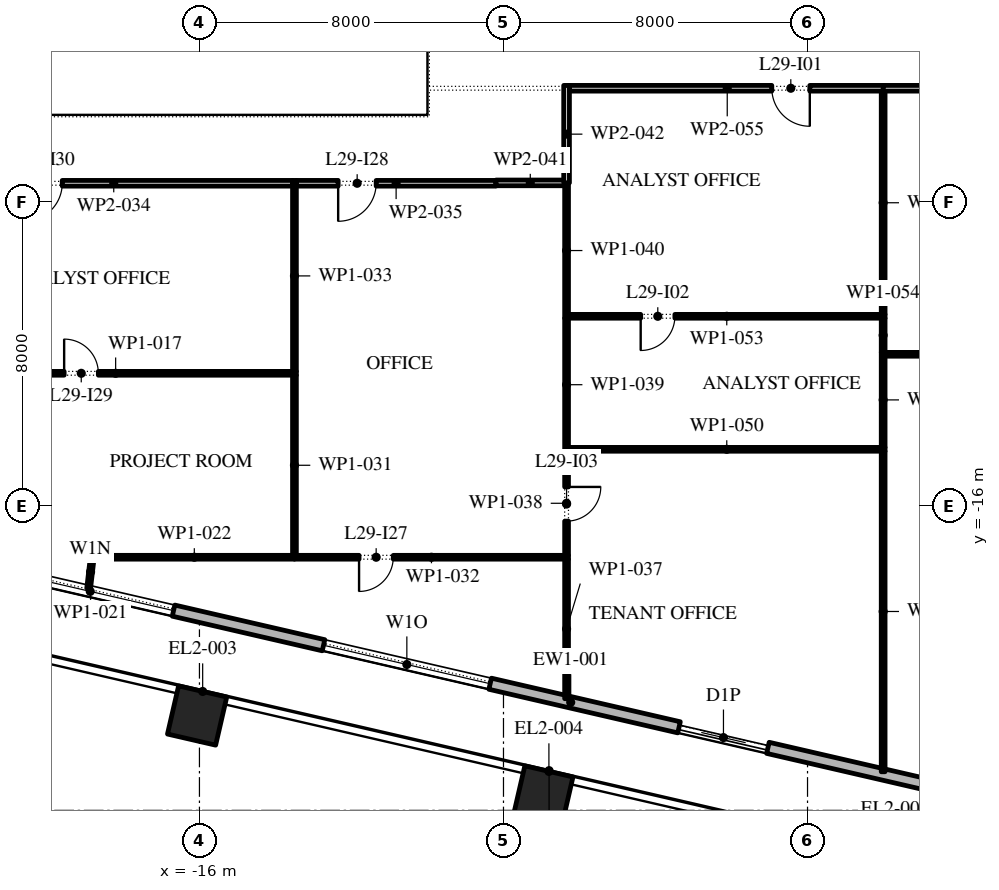
"""IFC4 building model, lengths in metres.
Left out: names, types, materials, properties, quantities, classifications, styles, units other than length and angle.
Written with IfcOpenShell. Run it as: python <this file> out.ifc"""

import sys

from ifc_helpers import new_model, si_unit, direction, frame, frame_2d, origin, origin_2d, place, context, subcontext, project, spatial, rectangle, extrude, element, fill, save


model = new_model("IFC4")
c1 = context("Model", 3, precision=1e-05, world=origin(), true_north=direction((0.0, 1.0)))
c2 = subcontext(c1, "Body", "Model", "MODEL_VIEW")
j1 = project(units=[si_unit("LENGTHUNIT", "METRE"), si_unit("PLANEANGLEUNIT", "RADIAN")], contexts=[c1])
p1 = place(None, origin())
s1 = spatial("IfcSite", under=j1, at=p1, CompositionType="ELEMENT")
p2 = place(p1, origin())
s2 = spatial("IfcBuilding", under=s1, at=p2, CompositionType="ELEMENT")
p3 = place(p2, frame((0.0, 0.0, 135.0)))
s3 = spatial("IfcBuildingStorey", under=s2, at=p3, CompositionType="ELEMENT", Elevation=135.0)
for number, where, z_axis, x_axis in (
    (1, (-16.061, -21.505, 0.0), (0.0, 0.0, 1.0), (0.974, -0.225, 0.0)),
    (2, (-6.951, -23.608, 0.0), (0.0, 0.0, 1.0), (0.974, -0.225, 0.0)),
):
    element("IfcColumn", number, at=place(p3, frame(where, z_axis=z_axis, x_axis=x_axis)), inside=s3, PredefinedType="COLUMN", context=c2, shape_type="SweptSolid", body=[
        extrude(rectangle(XDim=1.3, YDim=1.3, at=origin_2d()), origin(), (0.0, 0.0, 1.0), 4.2),
    ])
p4 = place(p3, frame((-31.078, -15.421, 0.0), z_axis=(0.0, 0.0, 1.0), x_axis=(0.974370456532, -0.224949357493, 0.0)))
e3 = element("IfcWall", 3, at=p4, inside=s3, PredefinedType="STANDARD", context=c2, shape_type="SweptSolid", body=[
    extrude(rectangle(XDim=51.0, YDim=0.3, at=frame_2d((25.5, 0.0))), origin(), (0.0, 0.0, 1.0), 4.0),
])
p5 = place(p4, frame((1.875, 0.0, 0.45)))
e4 = element("IfcOpeningElement", 4, at=p5, cuts=e3, PredefinedType="OPENING", context=c2, shape_type="SweptSolid", body=[
    extrude(rectangle(XDim=4.5, YDim=2.575, at=frame_2d((2.25, 1.288))), frame((0.0, 0.16, 0.0), z_axis=(0.0, -1.0, 0.0), x_axis=(1.0, 0.0, 0.0)), (0.0, 0.0, 1.0), 0.32),
])
p6 = place(p4, frame((10.275, 0.0, 0.45)))
e5 = element("IfcOpeningElement", 5, at=p6, cuts=e3, PredefinedType="OPENING", context=c2, shape_type="SweptSolid", body=[
    extrude(rectangle(XDim=4.5, YDim=2.525, at=frame_2d((2.25, 1.262))), frame((0.0, 0.16, 0.0), z_axis=(0.0, -1.0, 0.0), x_axis=(1.0, 0.0, 0.0)), (0.0, 0.0, 1.0), 0.32),
])
p7 = place(p4, frame((18.825, 0.0, 0.45)))
e6 = element("IfcOpeningElement", 6, at=p7, cuts=e3, PredefinedType="OPENING", context=c2, shape_type="SweptSolid", body=[
    extrude(rectangle(XDim=4.5, YDim=2.5, at=frame_2d((2.25, 1.25))), frame((0.0, 0.16, 0.0), z_axis=(0.0, -1.0, 0.0), x_axis=(1.0, 0.0, 0.0)), (0.0, 0.0, 1.0), 0.32),
])
p8 = place(p4, frame((28.425, 0.0, 0.0)))
e7 = element("IfcOpeningElement", 7, at=p8, cuts=e3, PredefinedType="OPENING", context=c2, shape_type="SweptSolid", body=[
    extrude(rectangle(XDim=2.4, YDim=2.9, at=frame_2d((1.2, 1.45))), frame((0.0, 0.16, 0.0), z_axis=(0.0, -1.0, 0.0), x_axis=(1.0, 0.0, 0.0)), (0.0, 0.0, 1.0), 0.32),
])
p9 = place(p4, frame((35.925, 0.0, 0.45)))
e8 = element("IfcOpeningElement", 8, at=p9, cuts=e3, PredefinedType="OPENING", context=c2, shape_type="SweptSolid", body=[
    extrude(rectangle(XDim=4.5, YDim=2.45, at=frame_2d((2.25, 1.225))), frame((0.0, 0.16, 0.0), z_axis=(0.0, -1.0, 0.0), x_axis=(1.0, 0.0, 0.0)), (0.0, 0.0, 1.0), 0.32),
])
p10 = place(p4, frame((44.475, 0.0, 0.45)))
e9 = element("IfcOpeningElement", 9, at=p10, cuts=e3, PredefinedType="OPENING", context=c2, shape_type="SweptSolid", body=[
    extrude(rectangle(XDim=4.5, YDim=2.45, at=frame_2d((2.25, 1.225))), frame((0.0, 0.16, 0.0), z_axis=(0.0, -1.0, 0.0), x_axis=(1.0, 0.0, 0.0)), (0.0, 0.0, 1.0), 0.32),
])
p11 = place(p3, frame((-22.96, -12.5, 0.0), z_axis=(0.0, 0.0, 1.0), x_axis=(1.0, 0.0, 0.0)))
e10 = element("IfcWall", 10, at=p11, inside=s3, PredefinedType="PARTITIONING", context=c2, shape_type="SweptSolid", body=[
    extrude(rectangle(XDim=9.51, YDim=0.1, at=frame_2d((4.755, 0.0))), origin(), (0.0, 0.0, 1.0), 4.0),
])
p12 = place(p11, frame((3.4, 0.0, 0.0)))
e11 = element("IfcOpeningElement", 11, at=p12, cuts=e10, PredefinedType="OPENING", context=c2, shape_type="SweptSolid", body=[
    extrude(rectangle(XDim=0.9, YDim=2.1, at=frame_2d((0.45, 1.05))), frame((0.0, 0.06, 0.0), z_axis=(0.0, -1.0, 0.0), x_axis=(1.0, 0.0, 0.0)), (0.0, 0.0, 1.0), 0.12),
])
p13 = place(p3, frame((-18.915, -18.157, 0.0), z_axis=(0.0, 0.0, 1.0), x_axis=(0.11580251051, 0.993272258024, 0.0)))
e12 = element("IfcWall", 12, at=p13, inside=s3, PredefinedType="PARTITIONING", context=c2, shape_type="SweptSolid", body=[
    extrude(rectangle(XDim=0.873, YDim=0.1, at=frame_2d((0.437, 0.0))), origin(), (0.0, 0.0, 1.0), 4.0),
])
p14 = place(p3, frame((-18.77, -17.34, 0.0), z_axis=(0.0, 0.0, 1.0), x_axis=(1.0, 0.0, 0.0)))
e13 = element("IfcWall", 13, at=p14, inside=s3, PredefinedType="PARTITIONING", context=c2, shape_type="SweptSolid", body=[
    extrude(rectangle(XDim=5.27, YDim=0.1, at=frame_2d((2.635, 0.0))), origin(), (0.0, 0.0, 1.0), 4.0),
])
p15 = place(p3, frame((-13.5, -17.29, 0.0), z_axis=(0.0, 0.0, 1.0), x_axis=(0.0, 1.0, 0.0)))
e14 = element("IfcWall", 14, at=p15, inside=s3, PredefinedType="PARTITIONING", context=c2, shape_type="SweptSolid", body=[
    extrude(rectangle(XDim=4.74, YDim=0.1, at=frame_2d((2.37, 0.0))), origin(), (0.0, 0.0, 1.0), 4.0),
])
p16 = place(p3, frame((-13.5, -17.34, 0.0), z_axis=(0.0, 0.0, 1.0), x_axis=(1.0, 0.0, 0.0)))
e15 = element("IfcWall", 15, at=p16, inside=s3, PredefinedType="PARTITIONING", context=c2, shape_type="SweptSolid", body=[
    extrude(rectangle(XDim=7.21, YDim=0.1, at=frame_2d((3.605, 0.0))), origin(), (0.0, 0.0, 1.0), 4.0),
])
p17 = place(p16, frame((1.7, 0.0, 0.0)))
e16 = element("IfcOpeningElement", 16, at=p17, cuts=e15, PredefinedType="OPENING", context=c2, shape_type="SweptSolid", body=[
    extrude(rectangle(XDim=0.9, YDim=2.1, at=frame_2d((0.45, 1.05))), frame((0.0, 0.06, 0.0), z_axis=(0.0, -1.0, 0.0), x_axis=(1.0, 0.0, 0.0)), (0.0, 0.0, 1.0), 0.12),
])
p18 = place(p3, frame((-13.5, -12.45, 0.0), z_axis=(0.0, 0.0, 1.0), x_axis=(0.0, 1.0, 0.0)))
e17 = element("IfcWall", 17, at=p18, inside=s3, PredefinedType="PARTITIONING", context=c2, shape_type="SweptSolid", body=[
    extrude(rectangle(XDim=5.025, YDim=0.1, at=frame_2d((2.512, 0.0))), origin(), (0.0, 0.0, 1.0), 4.0),
])
p19 = place(p3, frame((-13.55, -7.5, 0.0), z_axis=(0.0, 0.0, 1.0), x_axis=(-1.0, 0.0, 0.0)))
e18 = element("IfcWall", 18, at=p19, inside=s3, PredefinedType="PARTITIONING", context=c2, shape_type="SweptSolid", body=[
    extrude(rectangle(XDim=9.41, YDim=0.15, at=frame_2d((4.705, 0.0))), origin(), (0.0, 0.0, 1.0), 4.0),
])
p20 = place(p19, frame((6.06, 0.0, 0.0)))
e19 = element("IfcOpeningElement", 19, at=p20, cuts=e18, PredefinedType="OPENING", context=c2, shape_type="SweptSolid", body=[
    extrude(rectangle(XDim=1.0, YDim=2.1, at=frame_2d((0.5, 1.05))), frame((0.0, 0.085, 0.0), z_axis=(0.0, -1.0, 0.0), x_axis=(1.0, 0.0, 0.0)), (0.0, 0.0, 1.0), 0.17),
])
p21 = place(p3, frame((-8.2, -7.5, 0.0), z_axis=(0.0, 0.0, 1.0), x_axis=(-1.0, 0.0, 0.0)))
e20 = element("IfcWall", 20, at=p21, inside=s3, PredefinedType="PARTITIONING", context=c2, shape_type="SweptSolid", body=[
    extrude(rectangle(XDim=5.25, YDim=0.15, at=frame_2d((2.625, 0.0))), origin(), (0.0, 0.0, 1.0), 4.0),
])
p22 = place(p21, frame((3.15, 0.0, 0.0)))
e21 = element("IfcOpeningElement", 21, at=p22, cuts=e20, PredefinedType="OPENING", context=c2, shape_type="SweptSolid", body=[
    extrude(rectangle(XDim=1.0, YDim=2.1, at=frame_2d((0.5, 1.05))), frame((0.0, 0.085, 0.0), z_axis=(0.0, -1.0, 0.0), x_axis=(1.0, 0.0, 0.0)), (0.0, 0.0, 1.0), 0.17),
])
p23 = place(p3, frame((-6.34, -21.061, 0.0), z_axis=(0.0, 0.0, 1.0), x_axis=(0.0, 1.0, 0.0)))
e22 = element("IfcWall", 22, at=p23, inside=s3, PredefinedType="PARTITIONING", context=c2, shape_type="SweptSolid", body=[
    extrude(rectangle(XDim=3.671, YDim=0.1, at=frame_2d((1.835, 0.0))), origin(), (0.0, 0.0, 1.0), 4.0),
])
p24 = place(p3, frame((-6.34, -17.29, 0.0), z_axis=(0.0, 0.0, 1.0), x_axis=(0.0, 1.0, 0.0)))
e23 = element("IfcWall", 23, at=p24, inside=s3, PredefinedType="PARTITIONING", context=c2, shape_type="SweptSolid", body=[
    extrude(rectangle(XDim=2.74, YDim=0.1, at=frame_2d((1.37, 0.0))), origin(), (0.0, 0.0, 1.0), 4.0),
])
p25 = place(p24, frame((0.9, 0.0, 0.0)))
e24 = element("IfcOpeningElement", 24, at=p25, cuts=e23, PredefinedType="OPENING", context=c2, shape_type="SweptSolid", body=[
    extrude(rectangle(XDim=0.9, YDim=2.1, at=frame_2d((0.45, 1.05))), frame((0.0, 0.06, 0.0), z_axis=(0.0, -1.0, 0.0), x_axis=(1.0, 0.0, 0.0)), (0.0, 0.0, 1.0), 0.12),
])
p26 = place(p3, frame((-6.34, -14.55, 0.0), z_axis=(0.0, 0.0, 1.0), x_axis=(0.0, 1.0, 0.0)))
e25 = element("IfcWall", 25, at=p26, inside=s3, PredefinedType="PARTITIONING", context=c2, shape_type="SweptSolid", body=[
    extrude(rectangle(XDim=3.5, YDim=0.1, at=frame_2d((1.75, 0.0))), origin(), (0.0, 0.0, 1.0), 4.0),
])
p27 = place(p3, frame((-6.34, -11.05, 0.0), z_axis=(0.0, 0.0, 1.0), x_axis=(0.0, 1.0, 0.0)))
e26 = element("IfcWall", 26, at=p27, inside=s3, PredefinedType="PARTITIONING", context=c2, shape_type="SweptSolid", body=[
    extrude(rectangle(XDim=3.56, YDim=0.1, at=frame_2d((1.78, 0.0))), origin(), (0.0, 0.0, 1.0), 4.0),
])
p28 = place(p3, frame((-6.39, -7.49, 0.0), z_axis=(0.0, 0.0, 1.0), x_axis=(-1.0, 0.0, 0.0)))
e27 = element("IfcWall", 27, at=p28, inside=s3, PredefinedType="PARTITIONING", context=c2, shape_type="SweptSolid", body=[
    extrude(rectangle(XDim=1.81, YDim=0.15, at=frame_2d((0.905, 0.0))), origin(), (0.0, 0.0, 1.0), 4.0),
])
p29 = place(p3, frame((-6.34, -4.925, 0.0), z_axis=(0.0, 0.0, 1.0), x_axis=(0.0, -1.0, 0.0)))
e28 = element("IfcWall", 28, at=p29, inside=s3, PredefinedType="PARTITIONING", context=c2, shape_type="SweptSolid", body=[
    extrude(rectangle(XDim=2.565, YDim=0.15, at=frame_2d((1.282, 0.0))), origin(), (0.0, 0.0, 1.0), 4.0),
])
p30 = place(p3, frame((2.04, -14.5, 0.0), z_axis=(0.0, 0.0, 1.0), x_axis=(-1.0, 0.0, 0.0)))
e29 = element("IfcWall", 29, at=p30, inside=s3, PredefinedType="PARTITIONING", context=c2, shape_type="SweptSolid", body=[
    extrude(rectangle(XDim=8.33, YDim=0.1, at=frame_2d((4.165, 0.0))), origin(), (0.0, 0.0, 1.0), 4.0),
])
p31 = place(p3, frame((1.99, -14.55, 0.0), z_axis=(0.0, 0.0, 1.0), x_axis=(0.0, -1.0, 0.0)))
e30 = element("IfcWall", 30, at=p31, inside=s3, PredefinedType="PARTITIONING", context=c2, shape_type="SweptSolid", body=[
    extrude(rectangle(XDim=8.434, YDim=0.1, at=frame_2d((4.217, 0.0))), origin(), (0.0, 0.0, 1.0), 4.0),
])
p32 = place(p3, frame((1.99, -11.95, 0.0), z_axis=(0.0, 0.0, 1.0), x_axis=(0.0, -1.0, 0.0)))
e31 = element("IfcWall", 31, at=p32, inside=s3, PredefinedType="PARTITIONING", context=c2, shape_type="SweptSolid", body=[
    extrude(rectangle(XDim=2.5, YDim=0.1, at=frame_2d((1.25, 0.0))), origin(), (0.0, 0.0, 1.0), 4.0),
])
p33 = place(p3, frame((2.04, -11.0, 0.0), z_axis=(0.0, 0.0, 1.0), x_axis=(-1.0, 0.0, 0.0)))
e32 = element("IfcWall", 32, at=p33, inside=s3, PredefinedType="PARTITIONING", context=c2, shape_type="SweptSolid", body=[
    extrude(rectangle(XDim=8.33, YDim=0.1, at=frame_2d((4.165, 0.0))), origin(), (0.0, 0.0, 1.0), 4.0),
])
p34 = place(p33, frame((5.53, 0.0, 0.0)))
e33 = element("IfcOpeningElement", 33, at=p34, cuts=e32, PredefinedType="OPENING", context=c2, shape_type="SweptSolid", body=[
    extrude(rectangle(XDim=0.9, YDim=2.1, at=frame_2d((0.45, 1.05))), frame((0.0, 0.06, 0.0), z_axis=(0.0, -1.0, 0.0), x_axis=(1.0, 0.0, 0.0)), (0.0, 0.0, 1.0), 0.12),
])
p35 = place(p3, frame((1.99, -11.05, 0.0), z_axis=(0.0, 0.0, 1.0), x_axis=(0.0, -1.0, 0.0)))
e34 = element("IfcWall", 34, at=p35, inside=s3, PredefinedType="PARTITIONING", context=c2, shape_type="SweptSolid", body=[
    extrude(rectangle(XDim=0.9, YDim=0.1, at=frame_2d((0.45, 0.0))), origin(), (0.0, 0.0, 1.0), 4.0),
])
p36 = place(p3, frame((2.04, -5.0, 0.0), z_axis=(0.0, 0.0, 1.0), x_axis=(-1.0, 0.0, 0.0)))
e35 = element("IfcWall", 35, at=p36, inside=s3, PredefinedType="PARTITIONING", context=c2, shape_type="SweptSolid", body=[
    extrude(rectangle(XDim=8.305, YDim=0.15, at=frame_2d((4.152, 0.0))), origin(), (0.0, 0.0, 1.0), 4.0),
])
p37 = place(p36, frame((1.98, 0.0, 0.0)))
e36 = element("IfcOpeningElement", 36, at=p37, cuts=e35, PredefinedType="OPENING", context=c2, shape_type="SweptSolid", body=[
    extrude(rectangle(XDim=1.0, YDim=2.1, at=frame_2d((0.5, 1.05))), frame((0.0, 0.085, 0.0), z_axis=(0.0, -1.0, 0.0), x_axis=(1.0, 0.0, 0.0)), (0.0, 0.0, 1.0), 0.17),
])
p38 = place(p3, frame((1.99, -5.075, 0.0), z_axis=(0.0, 0.0, 1.0), x_axis=(0.0, -1.0, 0.0)))
e37 = element("IfcWall", 37, at=p38, inside=s3, PredefinedType="PARTITIONING", context=c2, shape_type="SweptSolid", body=[
    extrude(rectangle(XDim=5.875, YDim=0.1, at=frame_2d((2.938, 0.0))), origin(), (0.0, 0.0, 1.0), 4.0),
])
p39 = place(p3, frame((8.125, -5.0, 0.0), z_axis=(0.0, 0.0, 1.0), x_axis=(-1.0, 0.0, 0.0)))
e38 = element("IfcWall", 38, at=p39, inside=s3, PredefinedType="PARTITIONING", context=c2, shape_type="SweptSolid", body=[
    extrude(rectangle(XDim=6.135, YDim=0.15, at=frame_2d((3.067, 0.0))), origin(), (0.0, 0.0, 1.0), 4.0),
])
p40 = place(p3, frame((14.72, -12.0, 0.0), z_axis=(0.0, 0.0, 1.0), x_axis=(-1.0, 0.0, 0.0)))
e39 = element("IfcWall", 39, at=p40, inside=s3, PredefinedType="PARTITIONING", context=c2, shape_type="SweptSolid", body=[
    extrude(rectangle(XDim=12.68, YDim=0.1, at=frame_2d((6.34, 0.0))), origin(), (0.0, 0.0, 1.0), 4.0),
])
p41 = place(p40, frame((5.88, 0.0, 0.0)))
e40 = element("IfcOpeningElement", 40, at=p41, cuts=e39, PredefinedType="OPENING", context=c2, shape_type="SweptSolid", body=[
    extrude(rectangle(XDim=0.9, YDim=2.1, at=frame_2d((0.45, 1.05))), frame((0.0, 0.06, 0.0), z_axis=(0.0, -1.0, 0.0), x_axis=(1.0, 0.0, 0.0)), (0.0, 0.0, 1.0), 0.12),
])
p42 = place(p6, origin())
e41 = element("IfcWindow", 41, at=p42, inside=s3, PartitioningType="DOUBLE_PANEL_VERTICAL", PredefinedType="WINDOW", context=c2, shape_type="SweptSolid", body=[
    extrude(rectangle(XDim=4.5, YDim=2.525, at=frame_2d((2.25, 1.262))), frame((0.0, 0.03, 0.0), z_axis=(0.0, -1.0, 0.0), x_axis=(1.0, 0.0, 0.0)), (0.0, 0.0, 1.0), 0.06),
])
fill(e5, e41)
p43 = place(p7, origin())
e42 = element("IfcWindow", 42, at=p43, inside=s3, PartitioningType="DOUBLE_PANEL_VERTICAL", PredefinedType="WINDOW", context=c2, shape_type="SweptSolid", body=[
    extrude(rectangle(XDim=4.5, YDim=2.5, at=frame_2d((2.25, 1.25))), frame((0.0, 0.03, 0.0), z_axis=(0.0, -1.0, 0.0), x_axis=(1.0, 0.0, 0.0)), (0.0, 0.0, 1.0), 0.06),
])
fill(e6, e42)
p44 = place(p8, origin())
e43 = element("IfcDoor", 43, at=p44, inside=s3, OperationType="DOUBLE_DOOR_SLIDING", PredefinedType="DOOR", context=c2, shape_type="SweptSolid", body=[
    extrude(rectangle(XDim=2.4, YDim=2.9, at=frame_2d((1.2, 1.45))), frame((0.0, 0.025, 0.0), z_axis=(0.0, -1.0, 0.0), x_axis=(1.0, 0.0, 0.0)), (0.0, 0.0, 1.0), 0.05),
])
fill(e7, e43)
p45 = place(p37, origin())
e44 = element("IfcDoor", 44, at=p45, inside=s3, OperationType="SINGLE_SWING_RIGHT", PredefinedType="DOOR", context=c2, shape_type="SweptSolid", body=[
    extrude(rectangle(XDim=1.0, YDim=2.1, at=frame_2d((0.5, 1.05))), frame((0.0, 0.025, 0.0), z_axis=(0.0, -1.0, 0.0), x_axis=(1.0, 0.0, 0.0)), (0.0, 0.0, 1.0), 0.05),
])
fill(e36, e44)
p46 = place(p34, origin())
e45 = element("IfcDoor", 45, at=p46, inside=s3, OperationType="SINGLE_SWING_LEFT", PredefinedType="DOOR", context=c2, shape_type="SweptSolid", body=[
    extrude(rectangle(XDim=0.9, YDim=2.1, at=frame_2d((0.45, 1.05))), frame((0.0, 0.025, 0.0), z_axis=(0.0, -1.0, 0.0), x_axis=(1.0, 0.0, 0.0)), (0.0, 0.0, 1.0), 0.05),
])
fill(e33, e45)
p47 = place(p25, frame((0.9, 0.0, 0.0), z_axis=(0.0, 0.0, 1.0), x_axis=(-1.0, 0.0, 0.0)))
e46 = element("IfcDoor", 46, at=p47, inside=s3, OperationType="SINGLE_SWING_RIGHT", PredefinedType="DOOR", context=c2, shape_type="SweptSolid", body=[
    extrude(rectangle(XDim=0.9, YDim=2.1, at=frame_2d((0.45, 1.05))), frame((0.0, 0.025, 0.0), z_axis=(0.0, -1.0, 0.0), x_axis=(1.0, 0.0, 0.0)), (0.0, 0.0, 1.0), 0.05),
])
fill(e24, e46)
p48 = place(p17, frame((0.9, 0.0, 0.0), z_axis=(0.0, 0.0, 1.0), x_axis=(-1.0, 0.0, 0.0)))
e47 = element("IfcDoor", 47, at=p48, inside=s3, OperationType="SINGLE_SWING_LEFT", PredefinedType="DOOR", context=c2, shape_type="SweptSolid", body=[
    extrude(rectangle(XDim=0.9, YDim=2.1, at=frame_2d((0.45, 1.05))), frame((0.0, 0.025, 0.0), z_axis=(0.0, -1.0, 0.0), x_axis=(1.0, 0.0, 0.0)), (0.0, 0.0, 1.0), 0.05),
])
fill(e16, e47)
p49 = place(p22, origin())
e48 = element("IfcDoor", 48, at=p49, inside=s3, OperationType="SINGLE_SWING_LEFT", PredefinedType="DOOR", context=c2, shape_type="SweptSolid", body=[
    extrude(rectangle(XDim=1.0, YDim=2.1, at=frame_2d((0.5, 1.05))), frame((0.0, 0.025, 0.0), z_axis=(0.0, -1.0, 0.0), x_axis=(1.0, 0.0, 0.0)), (0.0, 0.0, 1.0), 0.05),
])
fill(e21, e48)
p50 = place(p12, origin())
e49 = element("IfcDoor", 49, at=p50, inside=s3, OperationType="SINGLE_SWING_RIGHT", PredefinedType="DOOR", context=c2, shape_type="SweptSolid", body=[
    extrude(rectangle(XDim=0.9, YDim=2.1, at=frame_2d((0.45, 1.05))), frame((0.0, 0.025, 0.0), z_axis=(0.0, -1.0, 0.0), x_axis=(1.0, 0.0, 0.0)), (0.0, 0.0, 1.0), 0.05),
])
fill(e11, e49)
p51 = place(p20, origin())
e50 = element("IfcDoor", 50, at=p51, inside=s3, OperationType="SINGLE_SWING_LEFT", PredefinedType="DOOR", context=c2, shape_type="SweptSolid", body=[
    extrude(rectangle(XDim=1.0, YDim=2.1, at=frame_2d((0.5, 1.05))), frame((0.0, 0.025, 0.0), z_axis=(0.0, -1.0, 0.0), x_axis=(1.0, 0.0, 0.0)), (0.0, 0.0, 1.0), 0.05),
])
fill(e19, e50)
save(model, sys.argv[1])
